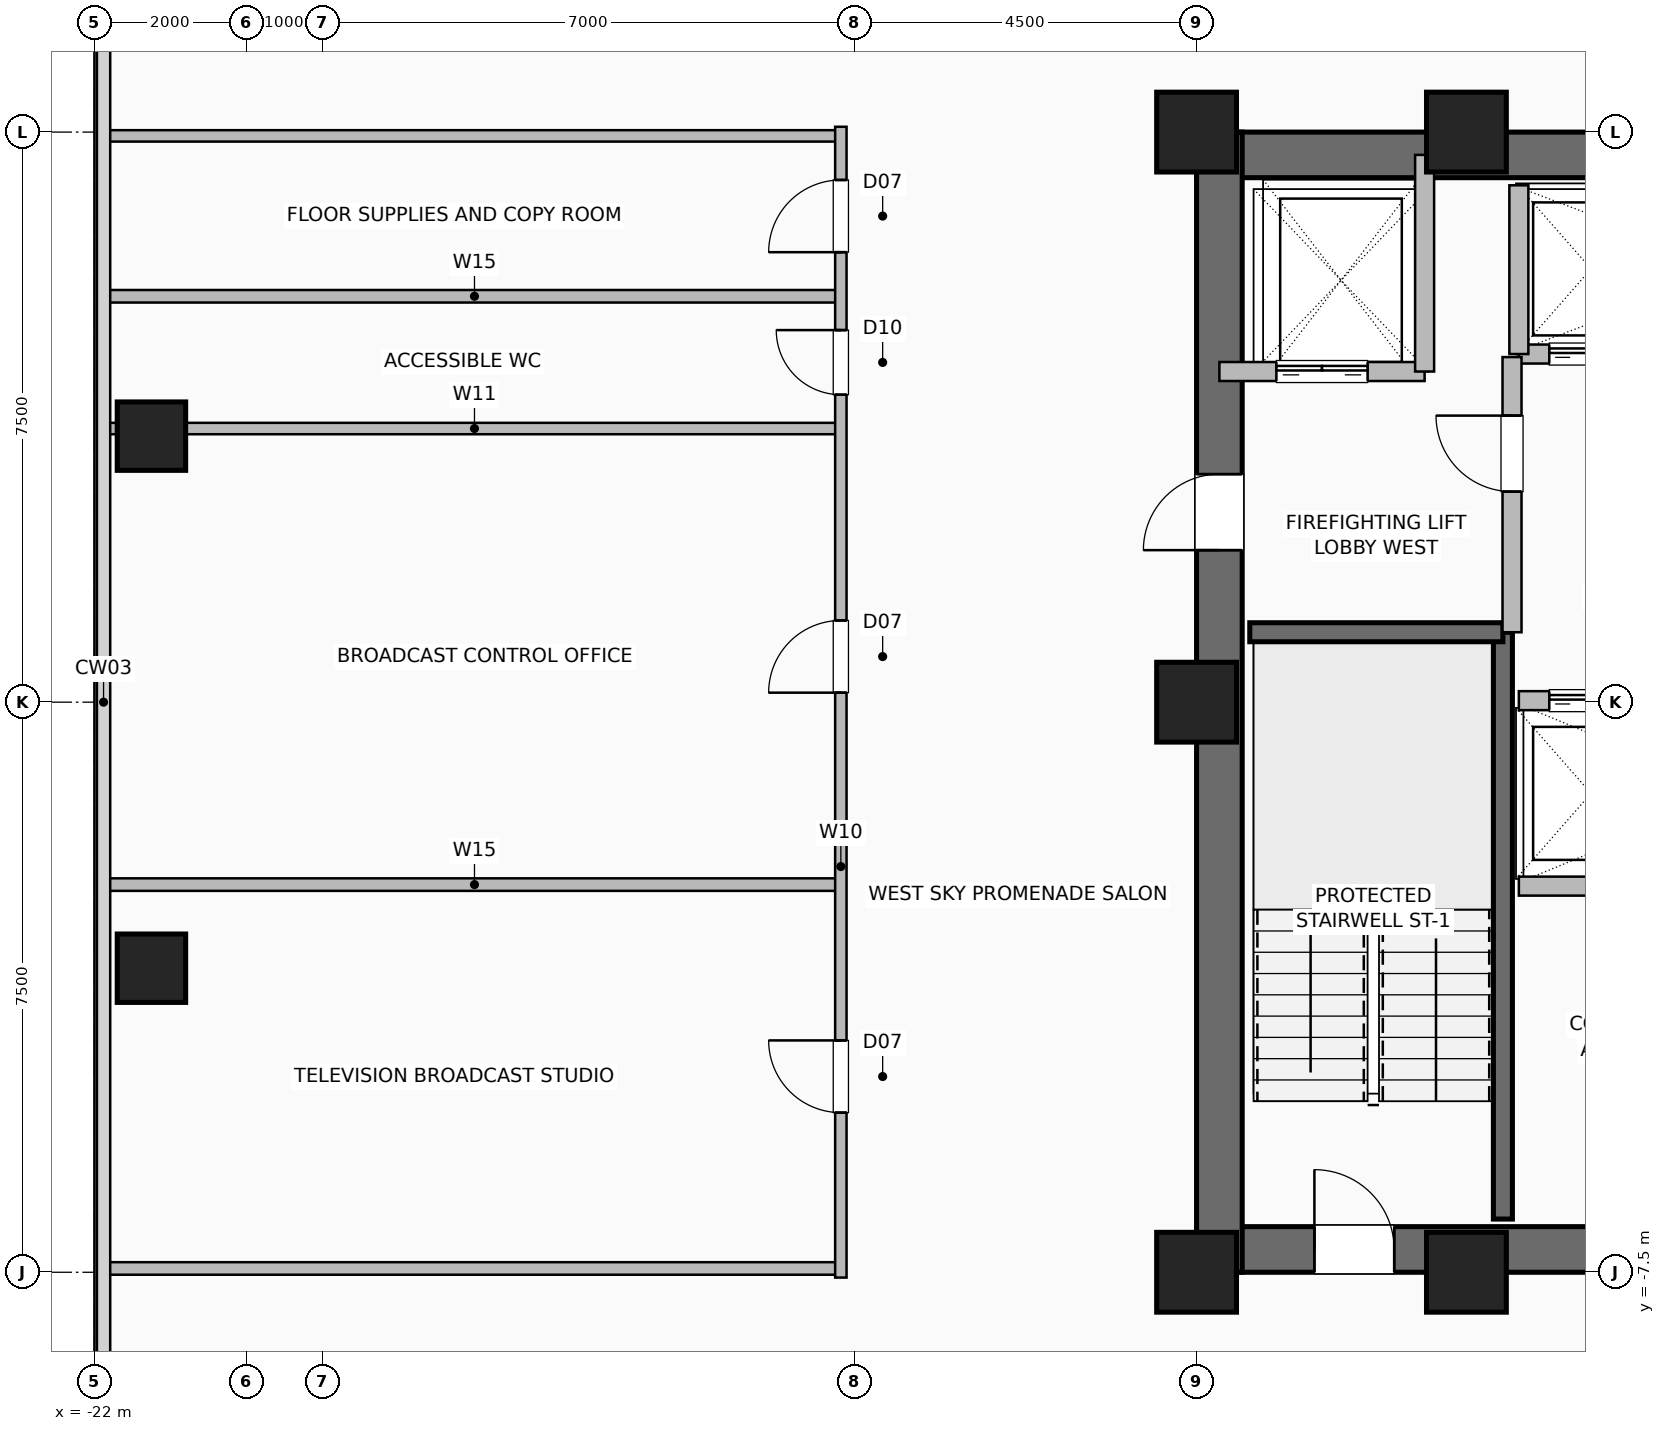
"""IFC4 building model, lengths in metres.
Left out: names, types, materials, properties, quantities, classifications, styles, units other than length and angle.
Written with IfcOpenShell. Run it as: python <this file> out.ifc"""

import sys

from ifc_helpers import new_model, si_unit, direction, frame, frame_2d, origin, origin_2d, place, context, subcontext, project, spatial, rectangle, hollow_rectangle, extrude, element, fill, save


model = new_model("IFC4")
c1 = context("Model", 3, precision=1e-05, world=origin(), true_north=direction((0.0, 1.0)))
c2 = subcontext(c1, "Body", "Model", "MODEL_VIEW")
j1 = project(units=[si_unit("LENGTHUNIT", "METRE"), si_unit("PLANEANGLEUNIT", "RADIAN")], contexts=[c1])
p1 = place(None, origin())
s1 = spatial("IfcSite", under=j1, at=p1, CompositionType="ELEMENT")
p2 = place(p1, origin())
s2 = spatial("IfcBuilding", under=s1, at=p2, CompositionType="ELEMENT")
p3 = place(p2, frame((0.0, 0.0, 140.8)))
s3 = spatial("IfcBuildingStorey", under=s2, at=p3, CompositionType="ELEMENT", Elevation=140.8)
for number, where, z_axis, x_axis in (
    (1, (-7.5, -7.5, 0.0), (0.0, 0.0, 1.0), (1.0, 0.0, 0.0)),
    (2, (-3.95, -7.5, 0.0), (0.0, 0.0, 1.0), (1.0, 0.0, 0.0)),
    (3, (-3.95, 7.5, 0.0), (0.0, 0.0, 1.0), (1.0, 0.0, 0.0)),
    (4, (-7.5, 7.5, 0.0), (0.0, 0.0, 1.0), (1.0, 0.0, 0.0)),
    (5, (-7.5, 0.0, 0.0), (0.0, 0.0, 1.0), (1.0, 0.0, 0.0)),
):
    element("IfcColumn", number, at=place(p3, frame(where, z_axis=z_axis, x_axis=x_axis)), inside=s3, PredefinedType="COLUMN", context=c2, shape_type="SweptSolid", body=[
        extrude(hollow_rectangle(XDim=1.05, YDim=1.05, WallThickness=0.05, at=origin_2d()), origin(), (0.0, 0.0, 1.0), 3.6),
    ])
for number, where, z_axis, x_axis in (
    (6, (-21.25, -3.5, 0.0), (0.0, 0.0, 1.0), (1.0, 0.0, 0.0)),
    (7, (-21.25, 3.5, 0.0), (0.0, 0.0, 1.0), (1.0, 0.0, 0.0)),
):
    element("IfcColumn", number, at=place(p3, frame(where, z_axis=z_axis, x_axis=x_axis)), inside=s3, PredefinedType="COLUMN", context=c2, shape_type="SweptSolid", body=[
        extrude(hollow_rectangle(XDim=0.9, YDim=0.9, WallThickness=0.045, at=origin_2d()), origin(), (0.0, 0.0, 1.0), 3.6),
    ])
p4 = place(p3, frame((-7.5, -7.2, 0.0), z_axis=(0.0, 0.0, 1.0), x_axis=(1.0, 0.0, 0.0)))
e8 = element("IfcWall", 8, at=p4, inside=s3, PredefinedType="SHEAR", context=c2, shape_type="SweptSolid", body=[
    extrude(rectangle(XDim=15.0, YDim=0.6, at=frame_2d((7.5, 0.0))), origin(), (0.0, 0.0, 1.0), 3.36),
])
p5 = place(p4, frame((1.55, 0.0, 0.0)))
e9 = element("IfcOpeningElement", 9, at=p5, cuts=e8, PredefinedType="OPENING", context=c2, shape_type="SweptSolid", body=[
    extrude(rectangle(XDim=1.05, YDim=2.08, at=frame_2d((0.525, 1.04))), frame((0.0, 0.31, 0.0), z_axis=(0.0, -1.0, 0.0), x_axis=(1.0, 0.0, 0.0)), (0.0, 0.0, 1.0), 0.62),
])
p6 = place(p4, frame((12.4, 0.0, 0.0)))
e10 = element("IfcOpeningElement", 10, at=p6, cuts=e8, PredefinedType="OPENING", context=c2, shape_type="SweptSolid", body=[
    extrude(rectangle(XDim=1.05, YDim=2.08, at=frame_2d((0.525, 1.04))), frame((0.0, 0.31, 0.0), z_axis=(0.0, -1.0, 0.0), x_axis=(1.0, 0.0, 0.0)), (0.0, 0.0, 1.0), 0.62),
])
p7 = place(p4, frame((5.2, 0.0, 0.0)))
e11 = element("IfcOpeningElement", 11, at=p7, cuts=e8, PredefinedType="OPENING", context=c2, shape_type="SweptSolid", body=[
    extrude(rectangle(XDim=1.0, YDim=2.08, at=frame_2d((0.5, 1.04))), frame((0.0, 0.31, 0.0), z_axis=(0.0, -1.0, 0.0), x_axis=(1.0, 0.0, 0.0)), (0.0, 0.0, 1.0), 0.62),
])
p8 = place(p4, frame((8.65, 0.0, 0.0)))
e12 = element("IfcOpeningElement", 12, at=p8, cuts=e8, PredefinedType="OPENING", context=c2, shape_type="SweptSolid", body=[
    extrude(rectangle(XDim=1.0, YDim=2.08, at=frame_2d((0.5, 1.04))), frame((0.0, 0.31, 0.0), z_axis=(0.0, -1.0, 0.0), x_axis=(1.0, 0.0, 0.0)), (0.0, 0.0, 1.0), 0.62),
])
p9 = place(p3, frame((-7.5, 7.2, 0.0), z_axis=(0.0, 0.0, 1.0), x_axis=(1.0, 0.0, 0.0)))
e13 = element("IfcWall", 13, at=p9, inside=s3, PredefinedType="SHEAR", context=c2, shape_type="SweptSolid", body=[
    extrude(rectangle(XDim=15.0, YDim=0.6, at=frame_2d((7.5, 0.0))), origin(), (0.0, 0.0, 1.0), 3.36),
])
p10 = place(p3, frame((-7.2, -7.5, 0.0), z_axis=(0.0, 0.0, 1.0), x_axis=(0.0, 1.0, 0.0)))
e14 = element("IfcWall", 14, at=p10, inside=s3, PredefinedType="SHEAR", context=c2, shape_type="SweptSolid", body=[
    extrude(rectangle(XDim=15.0, YDim=0.6, at=frame_2d((7.5, 0.0))), origin(), (0.0, 0.0, 1.0), 3.36),
])
p11 = place(p10, frame((9.5, 0.0, 0.0)))
e15 = element("IfcOpeningElement", 15, at=p11, cuts=e14, PredefinedType="OPENING", context=c2, shape_type="SweptSolid", body=[
    extrude(rectangle(XDim=1.0, YDim=2.08, at=frame_2d((0.5, 1.04))), frame((0.0, 0.31, 0.0), z_axis=(0.0, -1.0, 0.0), x_axis=(1.0, 0.0, 0.0)), (0.0, 0.0, 1.0), 0.62),
])
p12 = place(p3, frame((-3.47, -6.8, 0.0), z_axis=(0.0, 0.0, 1.0), x_axis=(0.0, 1.0, 0.0)))
e16 = element("IfcWall", 16, at=p12, inside=s3, PredefinedType="SHEAR", context=c2, shape_type="SweptSolid", body=[
    extrude(rectangle(XDim=7.72, YDim=0.25, at=frame_2d((3.86, 0.0))), origin(), (0.0, 0.0, 1.0), 3.36),
])
p13 = place(p3, frame((-6.8, 0.92, 0.0), z_axis=(0.0, 0.0, 1.0), x_axis=(1.0, 0.0, 0.0)))
e17 = element("IfcWall", 17, at=p13, inside=s3, PredefinedType="SHEAR", context=c2, shape_type="SweptSolid", body=[
    extrude(rectangle(XDim=3.33, YDim=0.25, at=frame_2d((1.665, 0.0))), origin(), (0.0, 0.0, 1.0), 3.36),
])
p14 = place(p3, frame((-3.26, 0.02, 0.0), z_axis=(0.0, 0.0, 1.0), x_axis=(1.0, 0.0, 0.0)))
e18 = element("IfcWall", 18, at=p14, inside=s3, PredefinedType="SHEAR", context=c2, shape_type="SweptSolid", body=[
    extrude(rectangle(XDim=5.64, YDim=0.25, at=frame_2d((2.82, 0.0))), origin(), (0.0, 0.0, 1.0), 3.36),
])
p15 = place(p14, frame((0.4, 0.0, 0.0)))
e19 = element("IfcOpeningElement", 19, at=p15, cuts=e18, PredefinedType="OPENING", context=c2, shape_type="SweptSolid", body=[
    extrude(rectangle(XDim=1.1, YDim=2.2, at=frame_2d((0.55, 1.1))), frame((0.0, 0.135, 0.0), z_axis=(0.0, -1.0, 0.0), x_axis=(1.0, 0.0, 0.0)), (0.0, 0.0, 1.0), 0.27),
])
p16 = place(p14, frame((2.28, 0.0, 0.0)))
e20 = element("IfcOpeningElement", 20, at=p16, cuts=e18, PredefinedType="OPENING", context=c2, shape_type="SweptSolid", body=[
    extrude(rectangle(XDim=1.1, YDim=2.2, at=frame_2d((0.55, 1.1))), frame((0.0, 0.135, 0.0), z_axis=(0.0, -1.0, 0.0), x_axis=(1.0, 0.0, 0.0)), (0.0, 0.0, 1.0), 0.27),
])
p17 = place(p14, frame((4.16, 0.0, 0.0)))
e21 = element("IfcOpeningElement", 21, at=p17, cuts=e18, PredefinedType="OPENING", context=c2, shape_type="SweptSolid", body=[
    extrude(rectangle(XDim=1.1, YDim=2.2, at=frame_2d((0.55, 1.1))), frame((0.0, 0.135, 0.0), z_axis=(0.0, -1.0, 0.0), x_axis=(1.0, 0.0, 0.0)), (0.0, 0.0, 1.0), 0.27),
])
p18 = place(p3, frame((-3.26, -2.42, 0.0), z_axis=(0.0, 0.0, 1.0), x_axis=(1.0, 0.0, 0.0)))
e22 = element("IfcWall", 22, at=p18, inside=s3, PredefinedType="SHEAR", context=c2, shape_type="SweptSolid", body=[
    extrude(rectangle(XDim=5.64, YDim=0.25, at=frame_2d((2.82, 0.0))), origin(), (0.0, 0.0, 1.0), 3.36),
])
p19 = place(p3, frame((-3.26, 4.58, 0.0), z_axis=(0.0, 0.0, 1.0), x_axis=(1.0, 0.0, 0.0)))
e23 = element("IfcWall", 23, at=p19, inside=s3, PredefinedType="SHEAR", context=c2, shape_type="SweptSolid", body=[
    extrude(rectangle(XDim=5.64, YDim=0.25, at=frame_2d((2.82, 0.0))), origin(), (0.0, 0.0, 1.0), 3.36),
])
p20 = place(p19, frame((0.4, 0.0, 0.0)))
e24 = element("IfcOpeningElement", 24, at=p20, cuts=e23, PredefinedType="OPENING", context=c2, shape_type="SweptSolid", body=[
    extrude(rectangle(XDim=1.1, YDim=2.2, at=frame_2d((0.55, 1.1))), frame((0.0, 0.135, 0.0), z_axis=(0.0, -1.0, 0.0), x_axis=(1.0, 0.0, 0.0)), (0.0, 0.0, 1.0), 0.27),
])
p21 = place(p19, frame((2.28, 0.0, 0.0)))
e25 = element("IfcOpeningElement", 25, at=p21, cuts=e23, PredefinedType="OPENING", context=c2, shape_type="SweptSolid", body=[
    extrude(rectangle(XDim=1.1, YDim=2.2, at=frame_2d((0.55, 1.1))), frame((0.0, 0.135, 0.0), z_axis=(0.0, -1.0, 0.0), x_axis=(1.0, 0.0, 0.0)), (0.0, 0.0, 1.0), 0.27),
])
p22 = place(p19, frame((4.16, 0.0, 0.0)))
e26 = element("IfcOpeningElement", 26, at=p22, cuts=e23, PredefinedType="OPENING", context=c2, shape_type="SweptSolid", body=[
    extrude(rectangle(XDim=1.1, YDim=2.2, at=frame_2d((0.55, 1.1))), frame((0.0, 0.135, 0.0), z_axis=(0.0, -1.0, 0.0), x_axis=(1.0, 0.0, 0.0)), (0.0, 0.0, 1.0), 0.27),
])
p23 = place(p3, frame((-3.26, 4.58, 0.0), z_axis=(0.0, 0.0, 1.0), x_axis=(0.0, 1.0, 0.0)))
e27 = element("IfcWall", 27, at=p23, inside=s3, PredefinedType="SHEAR", context=c2, shape_type="SweptSolid", body=[
    extrude(rectangle(XDim=2.22, YDim=0.25, at=frame_2d((1.11, 0.0))), origin(), (0.0, 0.0, 1.0), 3.36),
])
p24 = place(p3, frame((-7.2, 4.35, 0.0), z_axis=(0.0, 0.0, 1.0), x_axis=(1.0, 0.0, 0.0)))
e28 = element("IfcWall", 28, at=p24, inside=s3, PredefinedType="SHEAR", context=c2, shape_type="SweptSolid", body=[
    extrude(rectangle(XDim=2.7, YDim=0.25, at=frame_2d((1.35, 0.0))), origin(), (0.0, 0.0, 1.0), 3.36),
])
p25 = place(p24, frame((0.75, 0.0, 0.0)))
e29 = element("IfcOpeningElement", 29, at=p25, cuts=e28, PredefinedType="OPENING", context=c2, shape_type="SweptSolid", body=[
    extrude(rectangle(XDim=1.2, YDim=2.2, at=frame_2d((0.6, 1.1))), frame((0.0, 0.135, 0.0), z_axis=(0.0, -1.0, 0.0), x_axis=(1.0, 0.0, 0.0)), (0.0, 0.0, 1.0), 0.27),
])
p26 = place(p3, frame((-4.5, 4.35, 0.0), z_axis=(0.0, 0.0, 1.0), x_axis=(0.0, 1.0, 0.0)))
e30 = element("IfcWall", 30, at=p26, inside=s3, PredefinedType="SHEAR", context=c2, shape_type="SweptSolid", body=[
    extrude(rectangle(XDim=2.85, YDim=0.25, at=frame_2d((1.425, 0.0))), origin(), (0.0, 0.0, 1.0), 3.36),
])
p27 = place(p3, frame((-3.35, 0.92, 0.0), z_axis=(0.0, 0.0, 1.0), x_axis=(0.0, 1.0, 0.0)))
e31 = element("IfcWall", 31, at=p27, inside=s3, PredefinedType="SHEAR", context=c2, shape_type="SweptSolid", body=[
    extrude(rectangle(XDim=3.62, YDim=0.25, at=frame_2d((1.81, 0.0))), origin(), (0.0, 0.0, 1.0), 3.36),
])
p28 = place(p27, frame((1.85, 0.0, 0.0)))
e32 = element("IfcOpeningElement", 32, at=p28, cuts=e31, PredefinedType="OPENING", context=c2, shape_type="SweptSolid", body=[
    extrude(rectangle(XDim=1.0, YDim=2.08, at=frame_2d((0.5, 1.04))), frame((0.0, 0.135, 0.0), z_axis=(0.0, -1.0, 0.0), x_axis=(1.0, 0.0, 0.0)), (0.0, 0.0, 1.0), 0.27),
])
for number, where, z_axis, x_axis in (
    (33, (-21.82, 5.34, 0.0), (0.0, 0.0, 1.0), (1.0, 0.0, 0.0)),
    (34, (-21.82, -7.45, 0.0), (0.0, 0.0, 1.0), (1.0, 0.0, 0.0)),
    (35, (-21.82, -2.4, 0.0), (0.0, 0.0, 1.0), (1.0, 0.0, 0.0)),
):
    element("IfcWall", number, at=place(p3, frame(where, z_axis=z_axis, x_axis=x_axis)), inside=s3, PredefinedType="PLUMBINGWALL", context=c2, shape_type="SweptSolid", body=[
        extrude(rectangle(XDim=9.64, YDim=0.165, at=frame_2d((4.82, 0.0))), origin(), (0.0, 0.0, 1.0), 3.36),
    ])
p29 = place(p3, frame((-21.82, 3.6, 0.0), z_axis=(0.0, 0.0, 1.0), x_axis=(1.0, 0.0, 0.0)))
e36 = element("IfcWall", 36, at=p29, inside=s3, PredefinedType="PARTITIONING", context=c2, shape_type="SweptSolid", body=[
    extrude(rectangle(XDim=9.64, YDim=0.15, at=frame_2d((4.82, 0.0))), origin(), (0.0, 0.0, 1.0), 2.718),
])
p30 = place(p3, frame((-21.82, 7.45, 0.0), z_axis=(0.0, 0.0, 1.0), x_axis=(1.0, 0.0, 0.0)))
e37 = element("IfcWall", 37, at=p30, inside=s3, PredefinedType="PARTITIONING", context=c2, shape_type="SweptSolid", body=[
    extrude(rectangle(XDim=9.64, YDim=0.15, at=frame_2d((4.82, 0.0))), origin(), (0.0, 0.0, 1.0), 3.36),
])
p31 = place(p3, frame((-12.18, -7.57, 0.0), z_axis=(0.0, 0.0, 1.0), x_axis=(0.0, 1.0, 0.0)))
e38 = element("IfcWall", 38, at=p31, inside=s3, PredefinedType="PARTITIONING", context=c2, shape_type="SweptSolid", body=[
    extrude(rectangle(XDim=15.14, YDim=0.15, at=frame_2d((7.57, 0.0))), origin(), (0.0, 0.0, 1.0), 3.36),
])
p32 = place(p31, frame((2.17, 0.0, 0.0)))
e39 = element("IfcOpeningElement", 39, at=p32, cuts=e38, PredefinedType="OPENING", context=c2, shape_type="SweptSolid", body=[
    extrude(rectangle(XDim=0.95, YDim=2.06, at=frame_2d((0.475, 1.03))), frame((0.0, 0.085, 0.0), z_axis=(0.0, -1.0, 0.0), x_axis=(1.0, 0.0, 0.0)), (0.0, 0.0, 1.0), 0.17),
])
p33 = place(p31, frame((7.695, 0.0, 0.0)))
e40 = element("IfcOpeningElement", 40, at=p33, cuts=e38, PredefinedType="OPENING", context=c2, shape_type="SweptSolid", body=[
    extrude(rectangle(XDim=0.95, YDim=2.06, at=frame_2d((0.475, 1.03))), frame((0.0, 0.085, 0.0), z_axis=(0.0, -1.0, 0.0), x_axis=(1.0, 0.0, 0.0)), (0.0, 0.0, 1.0), 0.17),
])
p34 = place(p31, frame((11.615, 0.0, 0.0)))
e41 = element("IfcOpeningElement", 41, at=p34, cuts=e38, PredefinedType="OPENING", context=c2, shape_type="SweptSolid", body=[
    extrude(rectangle(XDim=0.85, YDim=2.05, at=frame_2d((0.425, 1.025))), frame((0.0, 0.085, 0.0), z_axis=(0.0, -1.0, 0.0), x_axis=(1.0, 0.0, 0.0)), (0.0, 0.0, 1.0), 0.17),
])
p35 = place(p31, frame((13.49, 0.0, 0.0)))
e42 = element("IfcOpeningElement", 42, at=p35, cuts=e38, PredefinedType="OPENING", context=c2, shape_type="SweptSolid", body=[
    extrude(rectangle(XDim=0.95, YDim=2.06, at=frame_2d((0.475, 1.03))), frame((0.0, 0.085, 0.0), z_axis=(0.0, -1.0, 0.0), x_axis=(1.0, 0.0, 0.0)), (0.0, 0.0, 1.0), 0.17),
])
p36 = place(p5, origin())
e43 = element("IfcDoor", 43, at=p36, inside=s3, OperationType="SINGLE_SWING_LEFT", PredefinedType="DOOR", context=c2, shape_type="SweptSolid", body=[
    extrude(rectangle(XDim=1.05, YDim=2.08, at=frame_2d((0.525, 1.04))), frame((0.0, 0.025, 0.0), z_axis=(0.0, -1.0, 0.0), x_axis=(1.0, 0.0, 0.0)), (0.0, 0.0, 1.0), 0.05),
])
fill(e9, e43)
p37 = place(p11, origin())
e44 = element("IfcDoor", 44, at=p37, inside=s3, OperationType="SINGLE_SWING_LEFT", PredefinedType="DOOR", context=c2, shape_type="SweptSolid", body=[
    extrude(rectangle(XDim=1.0, YDim=2.08, at=frame_2d((0.5, 1.04))), frame((0.0, 0.025, 0.0), z_axis=(0.0, -1.0, 0.0), x_axis=(1.0, 0.0, 0.0)), (0.0, 0.0, 1.0), 0.05),
])
fill(e15, e44)
p38 = place(p15, origin())
e45 = element("IfcDoor", 45, at=p38, inside=s3, OperationType="DOUBLE_DOOR_SLIDING", PredefinedType="DOOR", context=c2, shape_type="SweptSolid", body=[
    extrude(rectangle(XDim=1.1, YDim=2.2, at=frame_2d((0.55, 1.1))), frame((0.0, 0.025, 0.0), z_axis=(0.0, -1.0, 0.0), x_axis=(1.0, 0.0, 0.0)), (0.0, 0.0, 1.0), 0.05),
])
fill(e19, e45)
p39 = place(p20, origin())
e46 = element("IfcDoor", 46, at=p39, inside=s3, OperationType="DOUBLE_DOOR_SLIDING", PredefinedType="DOOR", context=c2, shape_type="SweptSolid", body=[
    extrude(rectangle(XDim=1.1, YDim=2.2, at=frame_2d((0.55, 1.1))), frame((0.0, 0.025, 0.0), z_axis=(0.0, -1.0, 0.0), x_axis=(1.0, 0.0, 0.0)), (0.0, 0.0, 1.0), 0.05),
])
fill(e24, e46)
p40 = place(p25, origin())
e47 = element("IfcDoor", 47, at=p40, inside=s3, OperationType="DOUBLE_DOOR_SLIDING", PredefinedType="DOOR", context=c2, shape_type="SweptSolid", body=[
    extrude(rectangle(XDim=1.2, YDim=2.2, at=frame_2d((0.6, 1.1))), frame((0.0, 0.025, 0.0), z_axis=(0.0, -1.0, 0.0), x_axis=(1.0, 0.0, 0.0)), (0.0, 0.0, 1.0), 0.05),
])
fill(e29, e47)
p41 = place(p28, origin())
e48 = element("IfcDoor", 48, at=p41, inside=s3, OperationType="SINGLE_SWING_RIGHT", PredefinedType="DOOR", context=c2, shape_type="SweptSolid", body=[
    extrude(rectangle(XDim=1.0, YDim=2.08, at=frame_2d((0.5, 1.04))), frame((0.0, 0.025, 0.0), z_axis=(0.0, -1.0, 0.0), x_axis=(1.0, 0.0, 0.0)), (0.0, 0.0, 1.0), 0.05),
])
fill(e32, e48)
p42 = place(p32, origin())
e49 = element("IfcDoor", 49, at=p42, inside=s3, OperationType="SINGLE_SWING_RIGHT", PredefinedType="DOOR", context=c2, shape_type="SweptSolid", body=[
    extrude(rectangle(XDim=0.95, YDim=2.06, at=frame_2d((0.475, 1.03))), frame((0.0, 0.025, 0.0), z_axis=(0.0, -1.0, 0.0), x_axis=(1.0, 0.0, 0.0)), (0.0, 0.0, 1.0), 0.05),
])
fill(e39, e49)
p43 = place(p33, origin())
e50 = element("IfcDoor", 50, at=p43, inside=s3, OperationType="SINGLE_SWING_LEFT", PredefinedType="DOOR", context=c2, shape_type="SweptSolid", body=[
    extrude(rectangle(XDim=0.95, YDim=2.06, at=frame_2d((0.475, 1.03))), frame((0.0, 0.025, 0.0), z_axis=(0.0, -1.0, 0.0), x_axis=(1.0, 0.0, 0.0)), (0.0, 0.0, 1.0), 0.05),
])
fill(e40, e50)
p44 = place(p34, origin())
e51 = element("IfcDoor", 51, at=p44, inside=s3, OperationType="SINGLE_SWING_RIGHT", PredefinedType="DOOR", context=c2, shape_type="SweptSolid", body=[
    extrude(rectangle(XDim=0.85, YDim=2.05, at=frame_2d((0.425, 1.025))), frame((0.0, 0.025, 0.0), z_axis=(0.0, -1.0, 0.0), x_axis=(1.0, 0.0, 0.0)), (0.0, 0.0, 1.0), 0.05),
])
fill(e41, e51)
p45 = place(p35, origin())
e52 = element("IfcDoor", 52, at=p45, inside=s3, OperationType="SINGLE_SWING_LEFT", PredefinedType="DOOR", context=c2, shape_type="SweptSolid", body=[
    extrude(rectangle(XDim=0.95, YDim=2.06, at=frame_2d((0.475, 1.03))), frame((0.0, 0.025, 0.0), z_axis=(0.0, -1.0, 0.0), x_axis=(1.0, 0.0, 0.0)), (0.0, 0.0, 1.0), 0.05),
])
fill(e42, e52)
save(model, sys.argv[1])
